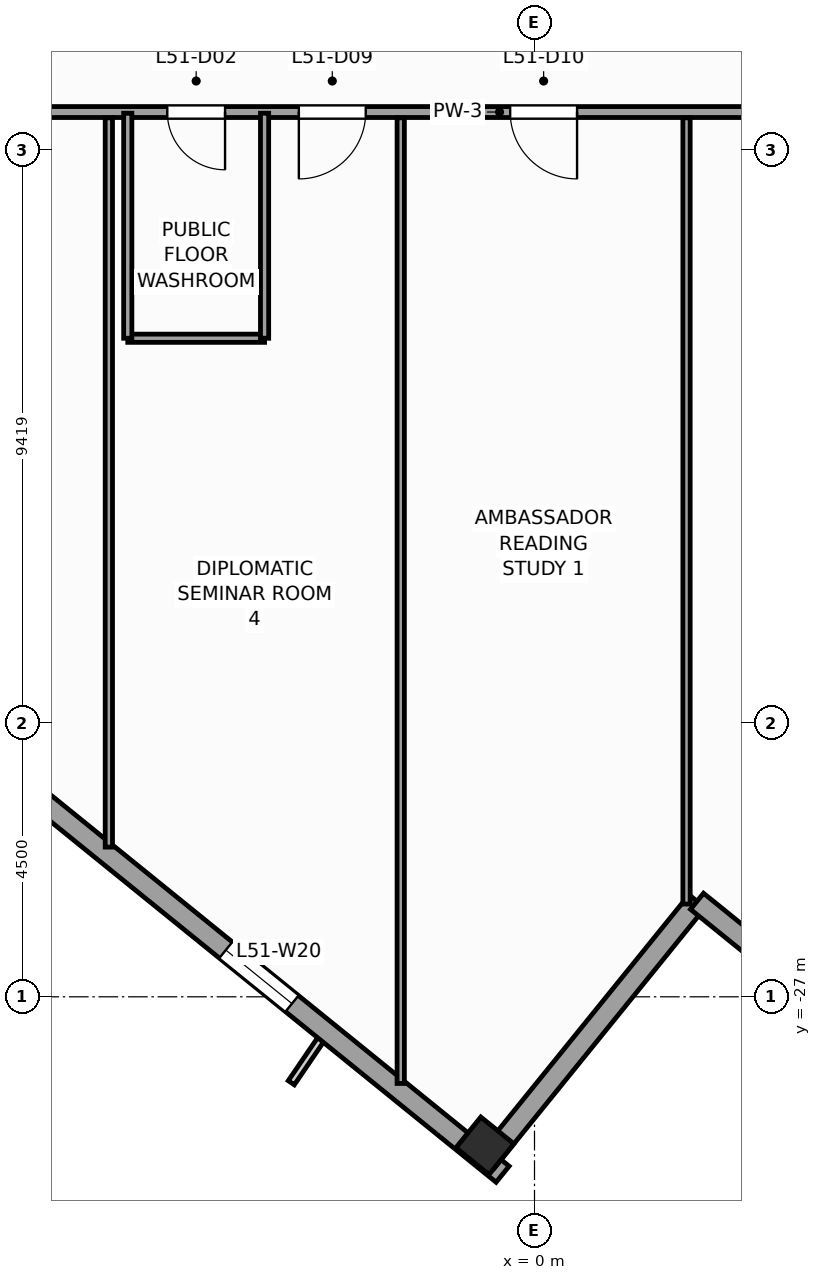
"""IFC4 building model, lengths in metres.
Left out: names, types, materials, properties, quantities, classifications, styles, units other than length and angle.
Written with IfcOpenShell. Run it as: python <this file> out.ifc"""

import sys

from ifc_helpers import new_model, si_unit, direction, frame, frame_2d, origin, origin_2d, place, context, subcontext, project, spatial, rectangle, extrude, source, transform, mapped, element, fill, save


model = new_model("IFC4")
c1 = context("Model", 3, precision=1e-05, world=origin(), true_north=direction((0.0, 1.0)))
c2 = subcontext(c1, "Body", "Model", "MODEL_VIEW")
j1 = project(units=[si_unit("LENGTHUNIT", "METRE"), si_unit("PLANEANGLEUNIT", "RADIAN")], contexts=[c1])
p1 = place(None, origin())
s1 = spatial("IfcSite", under=j1, at=p1, CompositionType="ELEMENT")
p2 = place(p1, origin())
s2 = spatial("IfcBuilding", under=s1, at=p2, CompositionType="ELEMENT")
p3 = place(p2, frame((0.0, 0.0, 213.4)))
s3 = spatial("IfcBuildingStorey", under=s2, at=p3, CompositionType="ELEMENT", Elevation=213.4)
m1 = source(origin(), c2, "Body", "SweptSolid", [
    extrude(rectangle(XDim=0.65, YDim=0.7, at=origin_2d()), origin(), (0.0, 0.0, 1.0), 3.9),
])
p4 = place(p3, frame((-0.815, -29.45, 0.0), z_axis=(0.0, 0.0, 1.0), x_axis=(0.62932039105, 0.777145961457, 0.0)))
e1 = element("IfcColumn", 1, at=p4, inside=s3, PredefinedType="COLUMN", context=c2, shape_type="MappedRepresentation", body=[
    mapped(m1, transform((0.0, 0.0, 0.0), scale=1.0)),
])
p5 = place(p3, frame((-29.154, -6.733, 0.0), z_axis=(0.0, 0.0, 1.0), x_axis=(0.77714192302, -0.629325378072, 0.0)))
e2 = element("IfcWall", 2, at=p5, inside=s3, PredefinedType="STANDARD", context=c2, shape_type="SweptSolid", body=[
    extrude(rectangle(XDim=36.84, YDim=0.34, at=frame_2d((18.42, 0.0))), origin(), (0.0, 0.0, 1.0), 2.96),
])
p6 = place(p5, frame((3.721, 0.0, 0.48)))
e3 = element("IfcOpeningElement", 3, at=p6, cuts=e2, PredefinedType="OPENING", context=c2, shape_type="SweptSolid", body=[
    extrude(rectangle(XDim=1.4, YDim=2.4, at=frame_2d((0.7, 1.2))), frame((0.0, 0.18, 0.0), z_axis=(0.0, -1.0, 0.0), x_axis=(1.0, 0.0, 0.0)), (0.0, 0.0, 1.0), 0.36),
])
p7 = place(p5, frame((9.809, 0.0, 0.58)))
e4 = element("IfcOpeningElement", 4, at=p7, cuts=e2, PredefinedType="OPENING", context=c2, shape_type="SweptSolid", body=[
    extrude(rectangle(XDim=1.75, YDim=2.3, at=frame_2d((0.875, 1.15))), frame((0.0, 0.18, 0.0), z_axis=(0.0, -1.0, 0.0), x_axis=(1.0, 0.0, 0.0)), (0.0, 0.0, 1.0), 0.36),
])
p8 = place(p5, frame((16.058, 0.0, 0.58)))
e5 = element("IfcOpeningElement", 5, at=p8, cuts=e2, PredefinedType="OPENING", context=c2, shape_type="SweptSolid", body=[
    extrude(rectangle(XDim=1.75, YDim=2.3, at=frame_2d((0.875, 1.15))), frame((0.0, 0.18, 0.0), z_axis=(0.0, -1.0, 0.0), x_axis=(1.0, 0.0, 0.0)), (0.0, 0.0, 1.0), 0.36),
])
p9 = place(p5, frame((24.176, 0.0, 0.58)))
e6 = element("IfcOpeningElement", 6, at=p9, cuts=e2, PredefinedType="OPENING", context=c2, shape_type="SweptSolid", body=[
    extrude(rectangle(XDim=1.75, YDim=2.3, at=frame_2d((0.875, 1.15))), frame((0.0, 0.18, 0.0), z_axis=(0.0, -1.0, 0.0), x_axis=(1.0, 0.0, 0.0)), (0.0, 0.0, 1.0), 0.36),
])
p10 = place(p5, frame((30.982, 0.0, 0.48)))
e7 = element("IfcOpeningElement", 7, at=p10, cuts=e2, PredefinedType="OPENING", context=c2, shape_type="SweptSolid", body=[
    extrude(rectangle(XDim=1.4, YDim=2.4, at=frame_2d((0.7, 1.2))), frame((0.0, 0.18, 0.0), z_axis=(0.0, -1.0, 0.0), x_axis=(1.0, 0.0, 0.0)), (0.0, 0.0, 1.0), 0.36),
])
p11 = place(p3, frame((-0.789, -29.703, 0.0), z_axis=(0.0, 0.0, 1.0), x_axis=(0.629323365087, 0.77714355312, 0.0)))
e8 = element("IfcWall", 8, at=p11, inside=s3, PredefinedType="STANDARD", context=c2, shape_type="SweptSolid", body=[
    extrude(rectangle(XDim=5.5, YDim=0.34, at=frame_2d((2.75, 0.0))), origin(), (0.0, 0.0, 1.0), 3.66),
])
p12 = place(p3, frame((2.673, -25.429, 0.0), z_axis=(0.0, 0.0, 1.0), x_axis=(0.777162640055, -0.629299794138, 0.0)))
e9 = element("IfcWall", 9, at=p12, inside=s3, PredefinedType="STANDARD", context=c2, shape_type="SweptSolid", body=[
    extrude(rectangle(XDim=5.67, YDim=0.34, at=frame_2d((2.835, 0.0))), origin(), (0.0, 0.0, 1.0), 3.66),
])
p13 = place(p12, frame((2.135, 0.0, 0.48)))
e10 = element("IfcOpeningElement", 10, at=p13, cuts=e9, PredefinedType="OPENING", context=c2, shape_type="SweptSolid", body=[
    extrude(rectangle(XDim=1.4, YDim=2.4, at=frame_2d((0.7, 1.2))), frame((0.0, 0.18, 0.0), z_axis=(0.0, -1.0, 0.0), x_axis=(1.0, 0.0, 0.0)), (0.0, 0.0, 1.0), 0.36),
])
p14 = place(p3, frame((-11.45, -12.45, 0.0), z_axis=(0.0, 0.0, 1.0), x_axis=(1.0, 0.0, 0.0)))
e11 = element("IfcWall", 11, at=p14, inside=s3, PredefinedType="PARTITIONING", context=c2, shape_type="SweptSolid", body=[
    extrude(rectangle(XDim=21.75, YDim=0.18, at=frame_2d((10.875, 0.0))), origin(), (0.0, 0.0, 1.0), 3.66),
])
p15 = place(p14, frame((5.411, 0.0, 0.0)))
e12 = element("IfcOpeningElement", 12, at=p15, cuts=e11, PredefinedType="OPENING", context=c2, shape_type="SweptSolid", body=[
    extrude(rectangle(XDim=0.95, YDim=2.1, at=frame_2d((0.475, 1.05))), frame((0.0, 0.1, 0.0), z_axis=(0.0, -1.0, 0.0), x_axis=(1.0, 0.0, 0.0)), (0.0, 0.0, 1.0), 0.2),
])
p16 = place(p14, frame((1.839, 0.0, 0.0)))
e13 = element("IfcOpeningElement", 13, at=p16, cuts=e11, PredefinedType="OPENING", context=c2, shape_type="SweptSolid", body=[
    extrude(rectangle(XDim=1.1, YDim=2.2, at=frame_2d((0.55, 1.1))), frame((0.0, 0.1, 0.0), z_axis=(0.0, -1.0, 0.0), x_axis=(1.0, 0.0, 0.0)), (0.0, 0.0, 1.0), 0.2),
])
p17 = place(p14, frame((7.574, 0.0, 0.0)))
e14 = element("IfcOpeningElement", 14, at=p17, cuts=e11, PredefinedType="OPENING", context=c2, shape_type="SweptSolid", body=[
    extrude(rectangle(XDim=1.1, YDim=2.2, at=frame_2d((0.55, 1.1))), frame((0.0, 0.1, 0.0), z_axis=(0.0, -1.0, 0.0), x_axis=(1.0, 0.0, 0.0)), (0.0, 0.0, 1.0), 0.2),
])
p18 = place(p14, frame((11.05, 0.0, 0.0)))
e15 = element("IfcOpeningElement", 15, at=p18, cuts=e11, PredefinedType="OPENING", context=c2, shape_type="SweptSolid", body=[
    extrude(rectangle(XDim=1.1, YDim=2.2, at=frame_2d((0.55, 1.1))), frame((0.0, 0.1, 0.0), z_axis=(0.0, -1.0, 0.0), x_axis=(1.0, 0.0, 0.0)), (0.0, 0.0, 1.0), 0.2),
])
p19 = place(p14, frame((15.65, 0.0, 0.0)))
e16 = element("IfcOpeningElement", 16, at=p19, cuts=e11, PredefinedType="OPENING", context=c2, shape_type="SweptSolid", body=[
    extrude(rectangle(XDim=1.1, YDim=2.2, at=frame_2d((0.55, 1.1))), frame((0.0, 0.1, 0.0), z_axis=(0.0, -1.0, 0.0), x_axis=(1.0, 0.0, 0.0)), (0.0, 0.0, 1.0), 0.2),
])
p20 = place(p3, frame((-7.0, -24.538, 0.0), z_axis=(0.0, 0.0, 1.0), x_axis=(0.0, 1.0, 0.0)))
e17 = element("IfcWall", 17, at=p20, inside=s3, PredefinedType="PARTITIONING", context=c2, shape_type="SweptSolid", body=[
    extrude(rectangle(XDim=11.993, YDim=0.12, at=frame_2d((5.997, 0.0))), origin(), (0.0, 0.0, 1.0), 3.66),
])
p21 = place(p3, frame((-2.2, -28.425, 0.0), z_axis=(0.0, 0.0, 1.0), x_axis=(0.0, 1.0, 0.0)))
e18 = element("IfcWall", 18, at=p21, inside=s3, PredefinedType="PARTITIONING", context=c2, shape_type="SweptSolid", body=[
    extrude(rectangle(XDim=15.88, YDim=0.12, at=frame_2d((7.94, 0.0))), origin(), (0.0, 0.0, 1.0), 3.66),
])
p22 = place(p3, frame((2.5, -25.475, 0.0), z_axis=(0.0, 0.0, 1.0), x_axis=(0.0, 1.0, 0.0)))
e19 = element("IfcWall", 19, at=p22, inside=s3, PredefinedType="PARTITIONING", context=c2, shape_type="SweptSolid", body=[
    extrude(rectangle(XDim=12.93, YDim=0.12, at=frame_2d((6.465, 0.0))), origin(), (0.0, 0.0, 1.0), 3.66),
])
p23 = place(p3, frame((-6.689, -16.17, 0.0), z_axis=(0.0, 0.0, 1.0), x_axis=(1.0, 0.0, 0.0)))
e20 = element("IfcWall", 20, at=p23, inside=s3, PredefinedType="PARTITIONING", context=c2, shape_type="SweptSolid", body=[
    extrude(rectangle(XDim=2.25, YDim=0.135, at=frame_2d((1.125, 0.0))), origin(), (0.0, 0.0, 1.0), 3.66),
])
for number, where, z_axis, x_axis in (
    (21, (-4.439, -16.17, 0.0), (0.0, 0.0, 1.0), (0.0, 1.0, 0.0)),
    (22, (-6.689, -16.17, 0.0), (0.0, 0.0, 1.0), (0.0, 1.0, 0.0)),
):
    element("IfcWall", number, at=place(p3, frame(where, z_axis=z_axis, x_axis=x_axis)), inside=s3, PredefinedType="PARTITIONING", context=c2, shape_type="SweptSolid", body=[
        extrude(rectangle(XDim=3.7, YDim=0.135, at=frame_2d((1.85, 0.0))), origin(), (0.0, 0.0, 1.0), 3.66),
    ])
m2 = source(origin(), c2, "Body", "SweptSolid", [
    extrude(rectangle(XDim=1.4, YDim=2.4, at=frame_2d((0.7, 1.2))), frame((0.0, 0.03, 0.0), z_axis=(0.0, -1.0, 0.0), x_axis=(1.0, 0.0, 0.0)), (0.0, 0.0, 1.0), 0.06),
])
p24 = place(p10, origin())
e23 = element("IfcWindow", 23, at=p24, inside=s3, PartitioningType="SINGLE_PANEL", PredefinedType="WINDOW", context=c2, shape_type="MappedRepresentation", body=[
    mapped(m2, transform((0.0, 0.0, 0.0), scale=1.0)),
])
fill(e7, e23)
m3 = source(origin(), c2, "Body", "SweptSolid", [
    extrude(rectangle(XDim=0.95, YDim=2.1, at=frame_2d((0.475, 1.05))), frame((0.0, 0.025, 0.0), z_axis=(0.0, -1.0, 0.0), x_axis=(1.0, 0.0, 0.0)), (0.0, 0.0, 1.0), 0.05),
])
p25 = place(p15, frame((0.95, 0.0, 0.0), z_axis=(0.0, 0.0, 1.0), x_axis=(-1.0, 0.0, 0.0)))
e24 = element("IfcDoor", 24, at=p25, inside=s3, OperationType="SINGLE_SWING_RIGHT", PredefinedType="DOOR", context=c2, shape_type="MappedRepresentation", body=[
    mapped(m3, transform((0.0, 0.0, 0.0), scale=1.0)),
])
fill(e12, e24)
m4 = source(origin(), c2, "Body", "SweptSolid", [
    extrude(rectangle(XDim=1.1, YDim=2.2, at=frame_2d((0.55, 1.1))), frame((0.0, 0.025, 0.0), z_axis=(0.0, -1.0, 0.0), x_axis=(1.0, 0.0, 0.0)), (0.0, 0.0, 1.0), 0.05),
])
p26 = place(p17, frame((1.1, 0.0, 0.0), z_axis=(0.0, 0.0, 1.0), x_axis=(-1.0, 0.0, 0.0)))
e25 = element("IfcDoor", 25, at=p26, inside=s3, OperationType="SINGLE_SWING_LEFT", PredefinedType="DOOR", context=c2, shape_type="MappedRepresentation", body=[
    mapped(m4, transform((0.0, 0.0, 0.0), scale=1.0)),
])
fill(e14, e25)
p27 = place(p18, frame((1.1, 0.0, 0.0), z_axis=(0.0, 0.0, 1.0), x_axis=(-1.0, 0.0, 0.0)))
e26 = element("IfcDoor", 26, at=p27, inside=s3, OperationType="SINGLE_SWING_RIGHT", PredefinedType="DOOR", context=c2, shape_type="MappedRepresentation", body=[
    mapped(m4, transform((0.0, 0.0, 0.0), scale=1.0)),
])
fill(e15, e26)
save(model, sys.argv[1])
